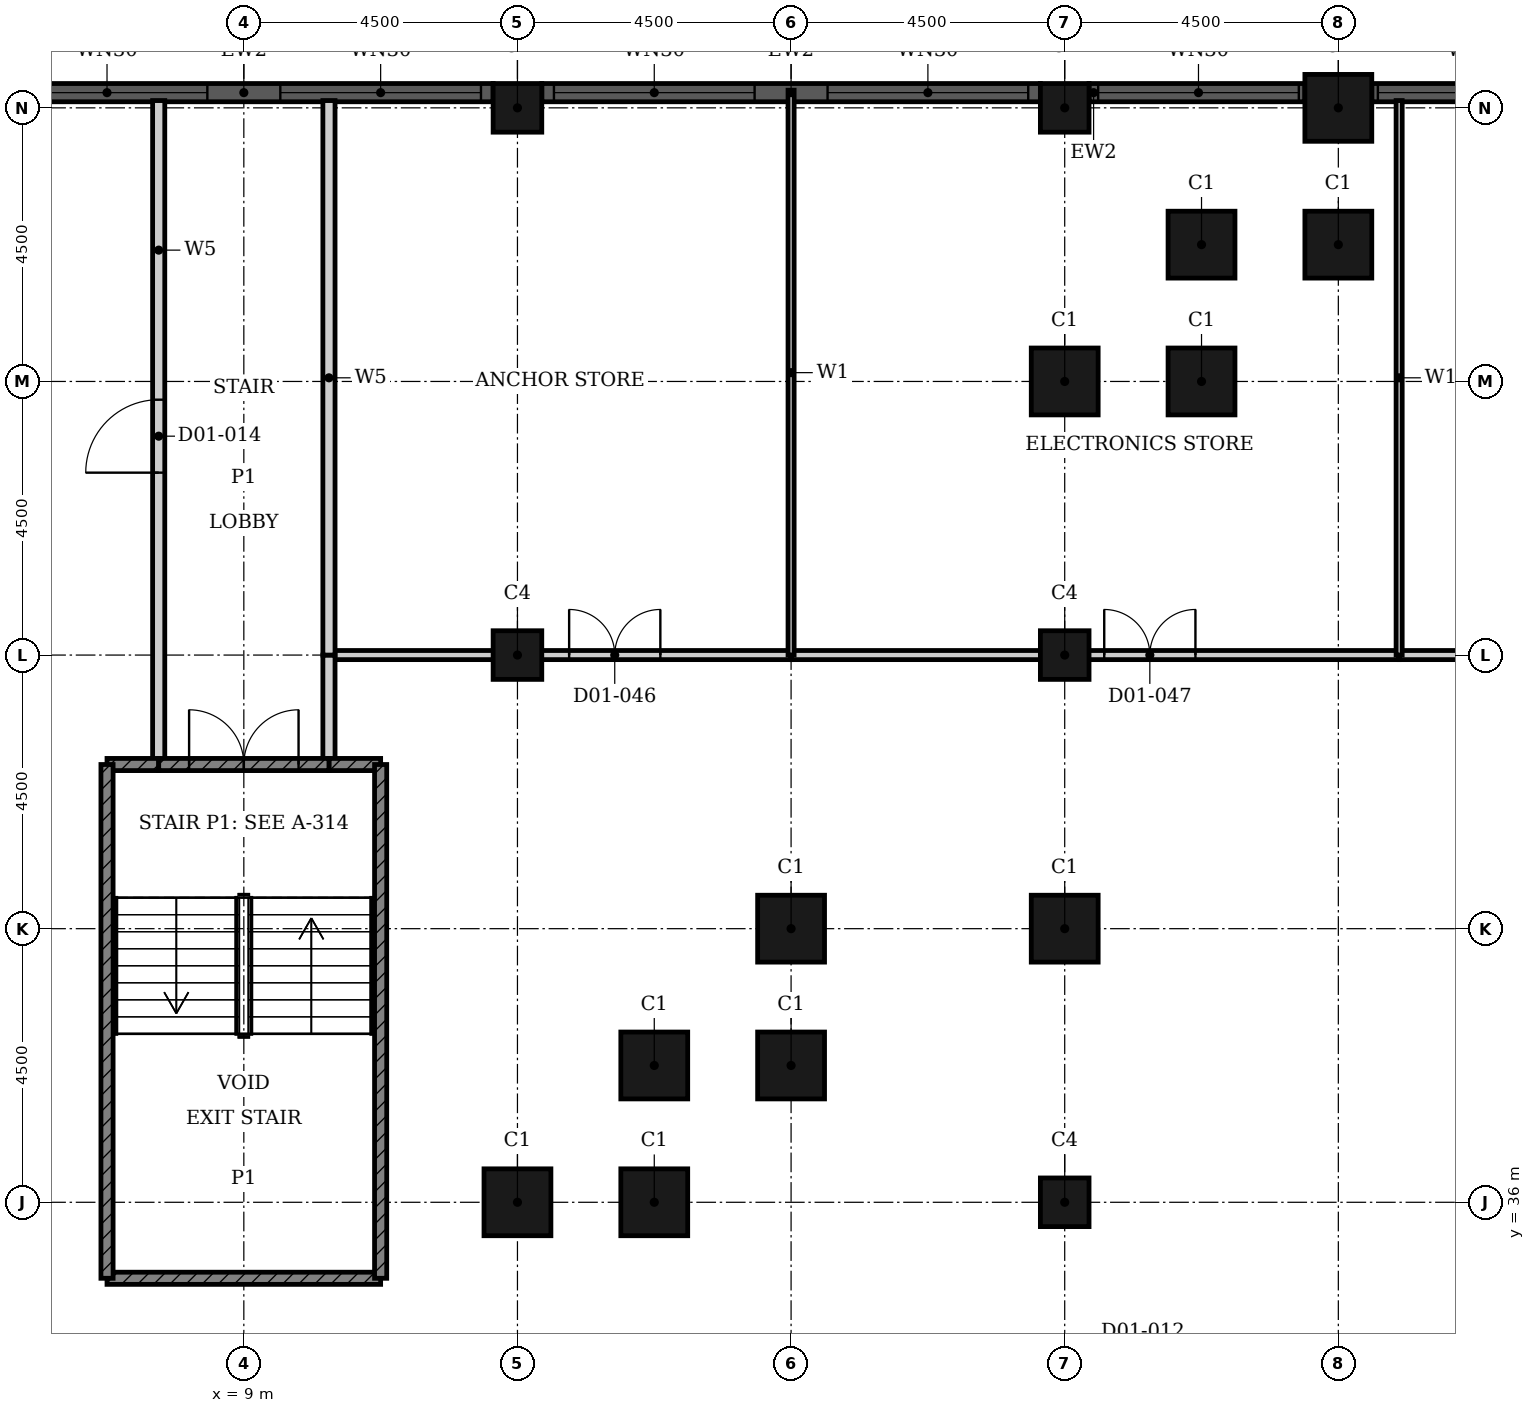
"""IFC4 building model, lengths in metres.
Left out: names, types, materials, properties, quantities, classifications, styles, units other than length and angle.
Written with IfcOpenShell. Run it as: python <this file> out.ifc"""

import sys

from ifc_helpers import new_model, si_unit, direction, frame, frame_2d, origin, origin_2d, place, context, subcontext, project, spatial, rectangle, hollow_rectangle, extrude, element, fill, save


model = new_model("IFC4")
c1 = context("Model", 3, precision=1e-05, world=origin(), true_north=direction((0.0, 1.0)))
c2 = subcontext(c1, "Body", "Model", "MODEL_VIEW")
j1 = project(units=[si_unit("LENGTHUNIT", "METRE"), si_unit("PLANEANGLEUNIT", "RADIAN")], contexts=[c1])
p1 = place(None, origin())
s1 = spatial("IfcSite", under=j1, at=p1, CompositionType="ELEMENT")
p2 = place(p1, origin())
s2 = spatial("IfcBuilding", under=s1, at=p2, CompositionType="ELEMENT")
p3 = place(p2, frame((0.0, 0.0, 6.6)))
s3 = spatial("IfcBuildingStorey", under=s2, at=p3, CompositionType="ELEMENT", Elevation=6.6)
for number, where, z_axis, x_axis in (
    (1, (27.0, 54.0, 0.0), (0.0, 0.0, 1.0), (1.0, 0.0, 0.0)),
    (2, (27.0, 51.75, 0.0), (0.0, 0.0, 1.0), (1.0, 0.0, 0.0)),
    (3, (24.75, 51.75, 0.0), (0.0, 0.0, 1.0), (1.0, 0.0, 0.0)),
    (4, (24.75, 49.5, 0.0), (0.0, 0.0, 1.0), (1.0, 0.0, 0.0)),
    (5, (22.5, 49.5, 0.0), (0.0, 0.0, 1.0), (1.0, 0.0, 0.0)),
    (6, (22.5, 40.5, 0.0), (0.0, 0.0, 1.0), (1.0, 0.0, 0.0)),
    (7, (18.0, 40.5, 0.0), (0.0, 0.0, 1.0), (1.0, 0.0, 0.0)),
    (8, (18.0, 38.25, 0.0), (0.0, 0.0, 1.0), (1.0, 0.0, 0.0)),
    (9, (15.75, 38.25, 0.0), (0.0, 0.0, 1.0), (1.0, 0.0, 0.0)),
    (10, (15.75, 36.0, 0.0), (0.0, 0.0, 1.0), (1.0, 0.0, 0.0)),
    (11, (13.5, 36.0, 0.0), (0.0, 0.0, 1.0), (1.0, 0.0, 0.0)),
):
    element("IfcColumn", number, at=place(p3, frame(where, z_axis=z_axis, x_axis=x_axis)), inside=s3, PredefinedType="COLUMN", context=c2, shape_type="SweptSolid", body=[
        extrude(hollow_rectangle(XDim=1.1, YDim=1.1, WallThickness=0.036, at=origin_2d()), origin(), (0.0, 0.0, 1.0), 5.4),
    ])
for number, where, z_axis, x_axis in (
    (12, (13.5, 54.0, 0.0), (0.0, 0.0, 1.0), (1.0, 0.0, 0.0)),
    (13, (22.5, 54.0, 0.0), (0.0, 0.0, 1.0), (1.0, 0.0, 0.0)),
    (14, (13.5, 45.0, 0.0), (0.0, 0.0, 1.0), (1.0, 0.0, 0.0)),
    (15, (22.5, 36.0, 0.0), (0.0, 0.0, 1.0), (1.0, 0.0, 0.0)),
    (16, (22.5, 45.0, 0.0), (0.0, 0.0, 1.0), (1.0, 0.0, 0.0)),
):
    element("IfcColumn", number, at=place(p3, frame(where, z_axis=z_axis, x_axis=x_axis)), inside=s3, PredefinedType="COLUMN", context=c2, shape_type="SweptSolid", body=[
        extrude(hollow_rectangle(XDim=0.8, YDim=0.8, WallThickness=0.025, at=origin_2d()), origin(), (0.0, 0.0, 1.0), 5.4),
    ])
p4 = place(p3, frame((31.1, 54.25, 0.0), z_axis=(0.0, 0.0, 1.0), x_axis=(-1.0, 0.0, 0.0)))
e17 = element("IfcWall", 17, at=p4, inside=s3, PredefinedType="SOLIDWALL", context=c2, shape_type="SweptSolid", body=[
    extrude(rectangle(XDim=3.55, YDim=0.3, at=frame_2d((1.775, 0.0))), origin(), (0.0, 0.0, 1.0), 5.4),
])
p5 = place(p4, frame((0.15, 0.0, 0.9)))
e18 = element("IfcOpeningElement", 18, at=p5, cuts=e17, PredefinedType="OPENING", context=c2, shape_type="SweptSolid", body=[
    extrude(rectangle(XDim=3.3, YDim=3.5, at=frame_2d((1.65, 1.75))), frame((0.0, 0.16, 0.0), z_axis=(0.0, -1.0, 0.0), x_axis=(1.0, 0.0, 0.0)), (0.0, 0.0, 1.0), 0.32),
])
p6 = place(p3, frame((26.45, 54.25, 0.0), z_axis=(0.0, 0.0, 1.0), x_axis=(-1.0, 0.0, 0.0)))
e19 = element("IfcWall", 19, at=p6, inside=s3, PredefinedType="SOLIDWALL", context=c2, shape_type="SweptSolid", body=[
    extrude(rectangle(XDim=3.55, YDim=0.3, at=frame_2d((1.775, 0.0))), origin(), (0.0, 0.0, 1.0), 5.4),
])
p7 = place(p6, frame((0.1, 0.0, 0.9)))
e20 = element("IfcOpeningElement", 20, at=p7, cuts=e19, PredefinedType="OPENING", context=c2, shape_type="SweptSolid", body=[
    extrude(rectangle(XDim=3.3, YDim=3.5, at=frame_2d((1.65, 1.75))), frame((0.0, 0.16, 0.0), z_axis=(0.0, -1.0, 0.0), x_axis=(1.0, 0.0, 0.0)), (0.0, 0.0, 1.0), 0.32),
])
p8 = place(p3, frame((22.1, 54.25, 0.0), z_axis=(0.0, 0.0, 1.0), x_axis=(-1.0, 0.0, 0.0)))
e21 = element("IfcWall", 21, at=p8, inside=s3, PredefinedType="SOLIDWALL", context=c2, shape_type="SweptSolid", body=[
    extrude(rectangle(XDim=8.2, YDim=0.3, at=frame_2d((4.1, 0.0))), origin(), (0.0, 0.0, 1.0), 5.4),
])
p9 = place(p8, frame((0.2, 0.0, 0.9)))
e22 = element("IfcOpeningElement", 22, at=p9, cuts=e21, PredefinedType="OPENING", context=c2, shape_type="SweptSolid", body=[
    extrude(rectangle(XDim=3.3, YDim=3.5, at=frame_2d((1.65, 1.75))), frame((0.0, 0.16, 0.0), z_axis=(0.0, -1.0, 0.0), x_axis=(1.0, 0.0, 0.0)), (0.0, 0.0, 1.0), 0.32),
])
p10 = place(p8, frame((4.7, 0.0, 0.9)))
e23 = element("IfcOpeningElement", 23, at=p10, cuts=e21, PredefinedType="OPENING", context=c2, shape_type="SweptSolid", body=[
    extrude(rectangle(XDim=3.3, YDim=3.5, at=frame_2d((1.65, 1.75))), frame((0.0, 0.16, 0.0), z_axis=(0.0, -1.0, 0.0), x_axis=(1.0, 0.0, 0.0)), (0.0, 0.0, 1.0), 0.32),
])
p11 = place(p3, frame((13.1, 54.25, 0.0), z_axis=(0.0, 0.0, 1.0), x_axis=(-1.0, 0.0, 0.0)))
e24 = element("IfcWall", 24, at=p11, inside=s3, PredefinedType="SOLIDWALL", context=c2, shape_type="SweptSolid", body=[
    extrude(rectangle(XDim=8.2, YDim=0.3, at=frame_2d((4.1, 0.0))), origin(), (0.0, 0.0, 1.0), 5.4),
])
p12 = place(p11, frame((0.2, 0.0, 0.9)))
e25 = element("IfcOpeningElement", 25, at=p12, cuts=e24, PredefinedType="OPENING", context=c2, shape_type="SweptSolid", body=[
    extrude(rectangle(XDim=3.3, YDim=3.5, at=frame_2d((1.65, 1.75))), frame((0.0, 0.16, 0.0), z_axis=(0.0, -1.0, 0.0), x_axis=(1.0, 0.0, 0.0)), (0.0, 0.0, 1.0), 0.32),
])
p13 = place(p11, frame((4.7, 0.0, 0.9)))
e26 = element("IfcOpeningElement", 26, at=p13, cuts=e24, PredefinedType="OPENING", context=c2, shape_type="SweptSolid", body=[
    extrude(rectangle(XDim=3.3, YDim=3.5, at=frame_2d((1.65, 1.75))), frame((0.0, 0.16, 0.0), z_axis=(0.0, -1.0, 0.0), x_axis=(1.0, 0.0, 0.0)), (0.0, 0.0, 1.0), 0.32),
])
p14 = place(p3, frame((10.4, 45.0, 0.0), z_axis=(0.0, 0.0, 1.0), x_axis=(1.0, 0.0, 0.0)))
e27 = element("IfcWall", 27, at=p14, inside=s3, PredefinedType="PARTITIONING", context=c2, shape_type="SweptSolid", body=[
    extrude(rectangle(XDim=7.6, YDim=0.15, at=frame_2d((3.8, 0.0))), origin(), (0.0, 0.0, 1.0), 5.05),
])
p15 = place(p14, frame((3.95, 0.0, 0.0)))
e28 = element("IfcOpeningElement", 28, at=p15, cuts=e27, PredefinedType="OPENING", context=c2, shape_type="SweptSolid", body=[
    extrude(rectangle(XDim=1.5, YDim=2.4, at=frame_2d((0.75, 1.2))), frame((0.0, 0.085, 0.0), z_axis=(0.0, -1.0, 0.0), x_axis=(1.0, 0.0, 0.0)), (0.0, 0.0, 1.0), 0.17),
])
p16 = place(p3, frame((18.0, 45.0, 0.0), z_axis=(0.0, 0.0, 1.0), x_axis=(1.0, 0.0, 0.0)))
e29 = element("IfcWall", 29, at=p16, inside=s3, PredefinedType="PARTITIONING", context=c2, shape_type="SweptSolid", body=[
    extrude(rectangle(XDim=10.0, YDim=0.15, at=frame_2d((5.0, 0.0))), origin(), (0.0, 0.0, 1.0), 5.05),
])
p17 = place(p16, frame((5.15, 0.0, 0.0)))
e30 = element("IfcOpeningElement", 30, at=p17, cuts=e29, PredefinedType="OPENING", context=c2, shape_type="SweptSolid", body=[
    extrude(rectangle(XDim=1.5, YDim=2.4, at=frame_2d((0.75, 1.2))), frame((0.0, 0.085, 0.0), z_axis=(0.0, -1.0, 0.0), x_axis=(1.0, 0.0, 0.0)), (0.0, 0.0, 1.0), 0.17),
])
p18 = place(p3, frame((28.0, 45.0, 0.0), z_axis=(0.0, 0.0, 1.0), x_axis=(1.0, 0.0, 0.0)))
e31 = element("IfcWall", 31, at=p18, inside=s3, PredefinedType="PARTITIONING", context=c2, shape_type="SweptSolid", body=[
    extrude(rectangle(XDim=6.75, YDim=0.15, at=frame_2d((3.375, 0.0))), origin(), (0.0, 0.0, 1.0), 5.05),
])
p19 = place(p18, frame((1.275, 0.0, 0.0)))
e32 = element("IfcOpeningElement", 32, at=p19, cuts=e31, PredefinedType="OPENING", context=c2, shape_type="SweptSolid", body=[
    extrude(rectangle(XDim=1.5, YDim=2.4, at=frame_2d((0.75, 1.2))), frame((0.0, 0.085, 0.0), z_axis=(0.0, -1.0, 0.0), x_axis=(1.0, 0.0, 0.0)), (0.0, 0.0, 1.0), 0.17),
])
p20 = place(p3, frame((18.0, 45.0, 0.0), z_axis=(0.0, 0.0, 1.0), x_axis=(0.0, 1.0, 0.0)))
e33 = element("IfcWall", 33, at=p20, inside=s3, PredefinedType="PARTITIONING", context=c2, shape_type="SweptSolid", body=[
    extrude(rectangle(XDim=9.29, YDim=0.1, at=frame_2d((4.645, 0.0))), origin(), (0.0, 0.0, 1.0), 5.05),
])
p21 = place(p3, frame((28.0, 45.0, 0.0), z_axis=(0.0, 0.0, 1.0), x_axis=(0.0, 1.0, 0.0)))
e34 = element("IfcWall", 34, at=p21, inside=s3, PredefinedType="PARTITIONING", context=c2, shape_type="SweptSolid", body=[
    extrude(rectangle(XDim=9.12, YDim=0.1, at=frame_2d((4.56, 0.0))), origin(), (0.0, 0.0, 1.0), 5.05),
])
p22 = place(p3, frame((10.4, 43.2, 0.0), z_axis=(0.0, 0.0, 1.0), x_axis=(0.0, 1.0, 0.0)))
e35 = element("IfcWall", 35, at=p22, inside=s3, PredefinedType="PARTITIONING", context=c2, shape_type="SweptSolid", body=[
    extrude(rectangle(XDim=1.8, YDim=0.2, at=frame_2d((0.9, 0.0))), origin(), (0.0, 0.0, 1.0), 5.05),
])
p23 = place(p3, frame((10.4, 45.0, 0.0), z_axis=(0.0, 0.0, 1.0), x_axis=(0.0, 1.0, 0.0)))
e36 = element("IfcWall", 36, at=p23, inside=s3, PredefinedType="PARTITIONING", context=c2, shape_type="SweptSolid", body=[
    extrude(rectangle(XDim=9.12, YDim=0.2, at=frame_2d((4.56, 0.0))), origin(), (0.0, 0.0, 1.0), 5.05),
])
p24 = place(p3, frame((7.6, 43.2, 0.0), z_axis=(0.0, 0.0, 1.0), x_axis=(0.0, 1.0, 0.0)))
e37 = element("IfcWall", 37, at=p24, inside=s3, PredefinedType="PARTITIONING", context=c2, shape_type="SweptSolid", body=[
    extrude(rectangle(XDim=10.92, YDim=0.2, at=frame_2d((5.46, 0.0))), origin(), (0.0, 0.0, 1.0), 5.05),
])
p25 = place(p24, frame((4.8, 0.0, 0.0)))
e38 = element("IfcOpeningElement", 38, at=p25, cuts=e37, PredefinedType="OPENING", context=c2, shape_type="SweptSolid", body=[
    extrude(rectangle(XDim=1.2, YDim=2.1, at=frame_2d((0.6, 1.05))), frame((0.0, 0.11, 0.0), z_axis=(0.0, -1.0, 0.0), x_axis=(1.0, 0.0, 0.0)), (0.0, 0.0, 1.0), 0.22),
])
p26 = place(p3, frame((6.75, 34.75, 0.0), z_axis=(0.0, 0.0, 1.0), x_axis=(1.0, 0.0, 0.0)))
e39 = element("IfcWall", 39, at=p26, inside=s3, PredefinedType="SHEAR", context=c2, shape_type="SweptSolid", body=[
    extrude(rectangle(XDim=4.5, YDim=0.2, at=frame_2d((2.25, 0.0))), origin(), (0.0, 0.0, 1.0), 5.05),
])
for number, where, z_axis, x_axis in (
    (40, (6.75, 43.2, 0.0), (0.0, 0.0, 1.0), (1.0, 0.0, 0.0)),
    (41, (10.4, 43.2, 0.0), (0.0, 0.0, 1.0), (1.0, 0.0, 0.0)),
):
    element("IfcWall", number, at=place(p3, frame(where, z_axis=z_axis, x_axis=x_axis)), inside=s3, PredefinedType="SHEAR", context=c2, shape_type="SweptSolid", body=[
        extrude(rectangle(XDim=0.85, YDim=0.2, at=frame_2d((0.425, 0.0))), origin(), (0.0, 0.0, 1.0), 5.05),
    ])
p27 = place(p3, frame((7.6, 43.2, 0.0), z_axis=(0.0, 0.0, 1.0), x_axis=(1.0, 0.0, 0.0)))
e42 = element("IfcWall", 42, at=p27, inside=s3, PredefinedType="SHEAR", context=c2, shape_type="SweptSolid", body=[
    extrude(rectangle(XDim=2.8, YDim=0.2, at=frame_2d((1.4, 0.0))), origin(), (0.0, 0.0, 1.0), 5.05),
])
p28 = place(p27, frame((0.5, 0.0, 0.0)))
e43 = element("IfcOpeningElement", 43, at=p28, cuts=e42, PredefinedType="OPENING", context=c2, shape_type="SweptSolid", body=[
    extrude(rectangle(XDim=1.8, YDim=2.1, at=frame_2d((0.9, 1.05))), frame((0.0, 0.11, 0.0), z_axis=(0.0, -1.0, 0.0), x_axis=(1.0, 0.0, 0.0)), (0.0, 0.0, 1.0), 0.22),
])
for number, where, z_axis, x_axis in (
    (44, (11.25, 34.75, 0.0), (0.0, 0.0, 1.0), (0.0, 1.0, 0.0)),
    (45, (6.75, 34.75, 0.0), (0.0, 0.0, 1.0), (0.0, 1.0, 0.0)),
):
    element("IfcWall", number, at=place(p3, frame(where, z_axis=z_axis, x_axis=x_axis)), inside=s3, PredefinedType="SHEAR", context=c2, shape_type="SweptSolid", body=[
        extrude(rectangle(XDim=8.45, YDim=0.2, at=frame_2d((4.225, 0.0))), origin(), (0.0, 0.0, 1.0), 5.05),
    ])
p29 = place(p5, origin())
e46 = element("IfcWindow", 46, at=p29, inside=s3, PartitioningType="SINGLE_PANEL", PredefinedType="WINDOW", context=c2, shape_type="SweptSolid", body=[
    extrude(rectangle(XDim=3.3, YDim=3.5, at=frame_2d((1.65, 1.75))), frame((0.0, 0.03, 0.0), z_axis=(0.0, -1.0, 0.0), x_axis=(1.0, 0.0, 0.0)), (0.0, 0.0, 1.0), 0.06),
])
fill(e18, e46)
p30 = place(p7, origin())
e47 = element("IfcWindow", 47, at=p30, inside=s3, PartitioningType="SINGLE_PANEL", PredefinedType="WINDOW", context=c2, shape_type="SweptSolid", body=[
    extrude(rectangle(XDim=3.3, YDim=3.5, at=frame_2d((1.65, 1.75))), frame((0.0, 0.03, 0.0), z_axis=(0.0, -1.0, 0.0), x_axis=(1.0, 0.0, 0.0)), (0.0, 0.0, 1.0), 0.06),
])
fill(e20, e47)
p31 = place(p9, origin())
e48 = element("IfcWindow", 48, at=p31, inside=s3, PartitioningType="SINGLE_PANEL", PredefinedType="WINDOW", context=c2, shape_type="SweptSolid", body=[
    extrude(rectangle(XDim=3.3, YDim=3.5, at=frame_2d((1.65, 1.75))), frame((0.0, 0.03, 0.0), z_axis=(0.0, -1.0, 0.0), x_axis=(1.0, 0.0, 0.0)), (0.0, 0.0, 1.0), 0.06),
])
fill(e22, e48)
p32 = place(p10, origin())
e49 = element("IfcWindow", 49, at=p32, inside=s3, PartitioningType="SINGLE_PANEL", PredefinedType="WINDOW", context=c2, shape_type="SweptSolid", body=[
    extrude(rectangle(XDim=3.3, YDim=3.5, at=frame_2d((1.65, 1.75))), frame((0.0, 0.03, 0.0), z_axis=(0.0, -1.0, 0.0), x_axis=(1.0, 0.0, 0.0)), (0.0, 0.0, 1.0), 0.06),
])
fill(e23, e49)
p33 = place(p12, origin())
e50 = element("IfcWindow", 50, at=p33, inside=s3, PartitioningType="SINGLE_PANEL", PredefinedType="WINDOW", context=c2, shape_type="SweptSolid", body=[
    extrude(rectangle(XDim=3.3, YDim=3.5, at=frame_2d((1.65, 1.75))), frame((0.0, 0.03, 0.0), z_axis=(0.0, -1.0, 0.0), x_axis=(1.0, 0.0, 0.0)), (0.0, 0.0, 1.0), 0.06),
])
fill(e25, e50)
p34 = place(p13, origin())
e51 = element("IfcWindow", 51, at=p34, inside=s3, PartitioningType="SINGLE_PANEL", PredefinedType="WINDOW", context=c2, shape_type="SweptSolid", body=[
    extrude(rectangle(XDim=3.3, YDim=3.5, at=frame_2d((1.65, 1.75))), frame((0.0, 0.03, 0.0), z_axis=(0.0, -1.0, 0.0), x_axis=(1.0, 0.0, 0.0)), (0.0, 0.0, 1.0), 0.06),
])
fill(e26, e51)
p35 = place(p25, origin())
e52 = element("IfcDoor", 52, at=p35, inside=s3, OperationType="SINGLE_SWING_LEFT", PredefinedType="DOOR", context=c2, shape_type="SweptSolid", body=[
    extrude(rectangle(XDim=1.2, YDim=2.1, at=frame_2d((0.6, 1.05))), frame((0.0, 0.025, 0.0), z_axis=(0.0, -1.0, 0.0), x_axis=(1.0, 0.0, 0.0)), (0.0, 0.0, 1.0), 0.05),
])
fill(e38, e52)
p36 = place(p28, origin())
e53 = element("IfcDoor", 53, at=p36, inside=s3, OperationType="DOUBLE_DOOR_SINGLE_SWING", PredefinedType="DOOR", context=c2, shape_type="SweptSolid", body=[
    extrude(rectangle(XDim=1.8, YDim=2.1, at=frame_2d((0.9, 1.05))), frame((0.0, 0.025, 0.0), z_axis=(0.0, -1.0, 0.0), x_axis=(1.0, 0.0, 0.0)), (0.0, 0.0, 1.0), 0.05),
])
fill(e43, e53)
p37 = place(p15, origin())
e54 = element("IfcDoor", 54, at=p37, inside=s3, OperationType="DOUBLE_DOOR_SINGLE_SWING", PredefinedType="DOOR", context=c2, shape_type="SweptSolid", body=[
    extrude(rectangle(XDim=1.5, YDim=2.4, at=frame_2d((0.75, 1.2))), frame((0.0, 0.025, 0.0), z_axis=(0.0, -1.0, 0.0), x_axis=(1.0, 0.0, 0.0)), (0.0, 0.0, 1.0), 0.05),
])
fill(e28, e54)
p38 = place(p17, origin())
e55 = element("IfcDoor", 55, at=p38, inside=s3, OperationType="DOUBLE_DOOR_SINGLE_SWING", PredefinedType="DOOR", context=c2, shape_type="SweptSolid", body=[
    extrude(rectangle(XDim=1.5, YDim=2.4, at=frame_2d((0.75, 1.2))), frame((0.0, 0.025, 0.0), z_axis=(0.0, -1.0, 0.0), x_axis=(1.0, 0.0, 0.0)), (0.0, 0.0, 1.0), 0.05),
])
fill(e30, e55)
save(model, sys.argv[1])
